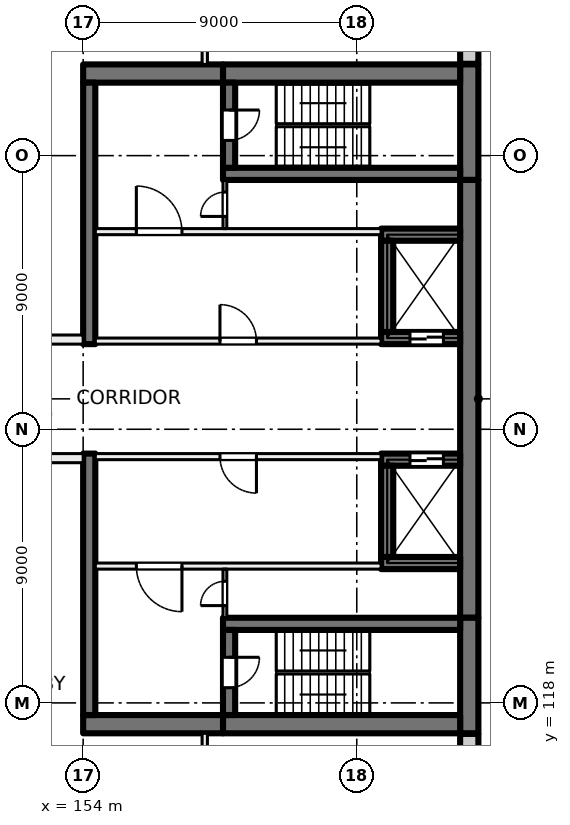
"""IFC4 building model, lengths in metres.
Left out: names, types, materials, properties, quantities, classifications, styles, units other than length and angle.
Written with IfcOpenShell. Run it as: python <this file> out.ifc"""

import sys

from ifc_helpers import new_model, si_unit, direction, frame, frame_2d, origin, place, context, subcontext, project, spatial, rectangle, extrude, element, fill, save


model = new_model("IFC4")
c1 = context("Model", 3, precision=1e-05, world=origin(), true_north=direction((0.0, 1.0)))
c2 = subcontext(c1, "Body", "Model", "MODEL_VIEW")
j1 = project(units=[si_unit("LENGTHUNIT", "METRE"), si_unit("PLANEANGLEUNIT", "RADIAN")], contexts=[c1])
p1 = place(None, origin())
s1 = spatial("IfcSite", under=j1, at=p1, CompositionType="ELEMENT")
p2 = place(p1, origin())
s2 = spatial("IfcBuilding", under=s1, at=p2, CompositionType="ELEMENT")
p3 = place(p2, frame((0.0, 0.0, 39.5)))
s3 = spatial("IfcBuildingStorey", under=s2, at=p3, CompositionType="ELEMENT", Elevation=39.5)
p4 = place(p3, frame((166.7, 139.0, 0.0), z_axis=(0.0, 0.0, 1.0), x_axis=(0.0, -1.0, 0.0)))
e1 = element("IfcWall", 1, at=p4, inside=s3, PredefinedType="SHEAR", context=c2, shape_type="SweptSolid", body=[
    extrude(rectangle(XDim=3.8, YDim=0.6, at=frame_2d((1.9, 0.0))), origin(), (0.0, 0.0, 1.0), 4.0),
])
p5 = place(p3, frame((166.7, 135.2, 0.0), z_axis=(0.0, 0.0, 1.0), x_axis=(0.0, -1.0, 0.0)))
e2 = element("IfcWall", 2, at=p5, inside=s3, PredefinedType="SHEAR", context=c2, shape_type="SweptSolid", body=[
    extrude(rectangle(XDim=14.4, YDim=0.6, at=frame_2d((7.2, 0.0))), origin(), (0.0, 0.0, 1.0), 4.0),
])
p6 = place(p3, frame((166.7, 120.8, 0.0), z_axis=(0.0, 0.0, 1.0), x_axis=(0.0, -1.0, 0.0)))
e3 = element("IfcWall", 3, at=p6, inside=s3, PredefinedType="SHEAR", context=c2, shape_type="SweptSolid", body=[
    extrude(rectangle(XDim=3.8, YDim=0.6, at=frame_2d((1.9, 0.0))), origin(), (0.0, 0.0, 1.0), 4.0),
])
for number, where, z_axis, x_axis in (
    (4, (166.4, 138.7, 0.0), (0.0, 0.0, 1.0), (-1.0, 0.0, 0.0)),
    (5, (166.4, 117.3, 0.0), (0.0, 0.0, 1.0), (-1.0, 0.0, 0.0)),
):
    element("IfcWall", number, at=place(p3, frame(where, z_axis=z_axis, x_axis=x_axis)), inside=s3, PredefinedType="SHEAR", context=c2, shape_type="SweptSolid", body=[
        extrude(rectangle(XDim=7.8, YDim=0.6, at=frame_2d((3.9, 0.0))), origin(), (0.0, 0.0, 1.0), 4.0),
    ])
for number, where, z_axis, x_axis in (
    (6, (158.6, 138.7, 0.0), (0.0, 0.0, 1.0), (-1.0, 0.0, 0.0)),
    (7, (158.6, 117.3, 0.0), (0.0, 0.0, 1.0), (-1.0, 0.0, 0.0)),
):
    element("IfcWall", number, at=place(p3, frame(where, z_axis=z_axis, x_axis=x_axis)), inside=s3, PredefinedType="SHEAR", context=c2, shape_type="SweptSolid", body=[
        extrude(rectangle(XDim=4.6, YDim=0.6, at=frame_2d((2.3, 0.0))), origin(), (0.0, 0.0, 1.0), 4.0),
    ])
p7 = place(p3, frame((166.4, 135.4, 0.0), z_axis=(0.0, 0.0, 1.0), x_axis=(-1.0, 0.0, 0.0)))
e8 = element("IfcWall", 8, at=p7, inside=s3, PredefinedType="SHEAR", context=c2, shape_type="SweptSolid", body=[
    extrude(rectangle(XDim=7.8, YDim=0.4, at=frame_2d((3.9, 0.0))), origin(), (0.0, 0.0, 1.0), 4.0),
])
p8 = place(p3, frame((158.8, 138.4, 0.0), z_axis=(0.0, 0.0, 1.0), x_axis=(0.0, -1.0, 0.0)))
e9 = element("IfcWall", 9, at=p8, inside=s3, PredefinedType="SHEAR", context=c2, shape_type="SweptSolid", body=[
    extrude(rectangle(XDim=2.8, YDim=0.4, at=frame_2d((1.4, 0.0))), origin(), (0.0, 0.0, 1.0), 4.0),
])
p9 = place(p8, frame((0.9, 0.0, 0.0)))
e10 = element("IfcOpeningElement", 10, at=p9, cuts=e9, PredefinedType="OPENING", context=c2, shape_type="SweptSolid", body=[
    extrude(rectangle(XDim=1.0, YDim=2.1, at=frame_2d((0.5, 1.05))), frame((0.0, 0.21, 0.0), z_axis=(0.0, -1.0, 0.0), x_axis=(1.0, 0.0, 0.0)), (0.0, 0.0, 1.0), 0.42),
])
p10 = place(p3, frame((166.4, 120.6, 0.0), z_axis=(0.0, 0.0, 1.0), x_axis=(-1.0, 0.0, 0.0)))
e11 = element("IfcWall", 11, at=p10, inside=s3, PredefinedType="SHEAR", context=c2, shape_type="SweptSolid", body=[
    extrude(rectangle(XDim=7.8, YDim=0.4, at=frame_2d((3.9, 0.0))), origin(), (0.0, 0.0, 1.0), 4.0),
])
p11 = place(p3, frame((158.8, 120.4, 0.0), z_axis=(0.0, 0.0, 1.0), x_axis=(0.0, -1.0, 0.0)))
e12 = element("IfcWall", 12, at=p11, inside=s3, PredefinedType="SHEAR", context=c2, shape_type="SweptSolid", body=[
    extrude(rectangle(XDim=2.8, YDim=0.4, at=frame_2d((1.4, 0.0))), origin(), (0.0, 0.0, 1.0), 4.0),
])
p12 = place(p11, frame((0.9, 0.0, 0.0)))
e13 = element("IfcOpeningElement", 13, at=p12, cuts=e12, PredefinedType="OPENING", context=c2, shape_type="SweptSolid", body=[
    extrude(rectangle(XDim=1.0, YDim=2.1, at=frame_2d((0.5, 1.05))), frame((0.0, 0.21, 0.0), z_axis=(0.0, -1.0, 0.0), x_axis=(1.0, 0.0, 0.0)), (0.0, 0.0, 1.0), 0.42),
])
p13 = place(p3, frame((166.4, 130.0, 0.0), z_axis=(0.0, 0.0, 1.0), x_axis=(-1.0, 0.0, 0.0)))
e14 = element("IfcWall", 14, at=p13, inside=s3, PredefinedType="SHEAR", context=c2, shape_type="SweptSolid", body=[
    extrude(rectangle(XDim=2.6, YDim=0.4, at=frame_2d((1.3, 0.0))), origin(), (0.0, 0.0, 1.0), 4.0),
])
p14 = place(p13, frame((0.55, 0.0, 0.0)))
e15 = element("IfcOpeningElement", 15, at=p14, cuts=e14, PredefinedType="OPENING", context=c2, shape_type="SweptSolid", body=[
    extrude(rectangle(XDim=1.1, YDim=2.1, at=frame_2d((0.55, 1.05))), frame((0.0, 0.21, 0.0), z_axis=(0.0, -1.0, 0.0), x_axis=(1.0, 0.0, 0.0)), (0.0, 0.0, 1.0), 0.42),
])
p15 = place(p3, frame((166.4, 133.4, 0.0), z_axis=(0.0, 0.0, 1.0), x_axis=(-1.0, 0.0, 0.0)))
e16 = element("IfcWall", 16, at=p15, inside=s3, PredefinedType="SHEAR", context=c2, shape_type="SweptSolid", body=[
    extrude(rectangle(XDim=2.6, YDim=0.4, at=frame_2d((1.3, 0.0))), origin(), (0.0, 0.0, 1.0), 4.0),
])
p16 = place(p3, frame((164.0, 133.2, 0.0), z_axis=(0.0, 0.0, 1.0), x_axis=(0.0, -1.0, 0.0)))
e17 = element("IfcWall", 17, at=p16, inside=s3, PredefinedType="SHEAR", context=c2, shape_type="SweptSolid", body=[
    extrude(rectangle(XDim=3.0, YDim=0.4, at=frame_2d((1.5, 0.0))), origin(), (0.0, 0.0, 1.0), 4.0),
])
p17 = place(p3, frame((166.4, 126.0, 0.0), z_axis=(0.0, 0.0, 1.0), x_axis=(-1.0, 0.0, 0.0)))
e18 = element("IfcWall", 18, at=p17, inside=s3, PredefinedType="SHEAR", context=c2, shape_type="SweptSolid", body=[
    extrude(rectangle(XDim=2.6, YDim=0.4, at=frame_2d((1.3, 0.0))), origin(), (0.0, 0.0, 1.0), 4.0),
])
p18 = place(p17, frame((0.55, 0.0, 0.0)))
e19 = element("IfcOpeningElement", 19, at=p18, cuts=e18, PredefinedType="OPENING", context=c2, shape_type="SweptSolid", body=[
    extrude(rectangle(XDim=1.1, YDim=2.1, at=frame_2d((0.55, 1.05))), frame((0.0, 0.21, 0.0), z_axis=(0.0, -1.0, 0.0), x_axis=(1.0, 0.0, 0.0)), (0.0, 0.0, 1.0), 0.42),
])
p19 = place(p3, frame((166.4, 122.6, 0.0), z_axis=(0.0, 0.0, 1.0), x_axis=(-1.0, 0.0, 0.0)))
e20 = element("IfcWall", 20, at=p19, inside=s3, PredefinedType="SHEAR", context=c2, shape_type="SweptSolid", body=[
    extrude(rectangle(XDim=2.6, YDim=0.4, at=frame_2d((1.3, 0.0))), origin(), (0.0, 0.0, 1.0), 4.0),
])
p20 = place(p3, frame((164.0, 125.8, 0.0), z_axis=(0.0, 0.0, 1.0), x_axis=(0.0, -1.0, 0.0)))
e21 = element("IfcWall", 21, at=p20, inside=s3, PredefinedType="SHEAR", context=c2, shape_type="SweptSolid", body=[
    extrude(rectangle(XDim=3.0, YDim=0.4, at=frame_2d((1.5, 0.0))), origin(), (0.0, 0.0, 1.0), 4.0),
])
for number, where, z_axis, x_axis in (
    (22, (154.2, 138.4, 0.0), (0.0, 0.0, 1.0), (0.0, -1.0, 0.0)),
    (23, (154.2, 126.2, 0.0), (0.0, 0.0, 1.0), (0.0, -1.0, 0.0)),
):
    element("IfcWall", number, at=place(p3, frame(where, z_axis=z_axis, x_axis=x_axis)), inside=s3, PredefinedType="SHEAR", context=c2, shape_type="SweptSolid", body=[
        extrude(rectangle(XDim=8.6, YDim=0.4, at=frame_2d((4.3, 0.0))), origin(), (0.0, 0.0, 1.0), 4.0),
    ])
p21 = place(p3, frame((166.7, 116.98, 0.0), z_axis=(0.0, 0.0, 1.0), x_axis=(0.0, -1.0, 0.0)))
e24 = element("IfcWall", 24, at=p21, inside=s3, PredefinedType="SOLIDWALL", context=c2, shape_type="SweptSolid", body=[
    extrude(rectangle(XDim=2.98, YDim=0.6, at=frame_2d((1.49, 0.0))), origin(), (0.0, 0.0, 1.0), 3.625),
])
p22 = place(p3, frame((166.7, 141.93, 0.0), z_axis=(0.0, 0.0, 1.0), x_axis=(0.0, -1.0, 0.0)))
e25 = element("IfcWall", 25, at=p22, inside=s3, PredefinedType="SOLIDWALL", context=c2, shape_type="SweptSolid", body=[
    extrude(rectangle(XDim=2.91, YDim=0.6, at=frame_2d((1.455, 0.0))), origin(), (0.0, 0.0, 1.0), 3.625),
])
p23 = place(p3, frame((163.8, 126.1, 0.0), z_axis=(0.0, 0.0, 1.0), x_axis=(-1.0, 0.0, 0.0)))
e26 = element("IfcWall", 26, at=p23, inside=s3, PredefinedType="PARTITIONING", context=c2, shape_type="SweptSolid", body=[
    extrude(rectangle(XDim=9.4, YDim=0.2, at=frame_2d((4.7, 0.0))), origin(), (0.0, 0.0, 1.0), 3.625),
])
p24 = place(p23, frame((4.1, 0.0, 0.0)))
e27 = element("IfcOpeningElement", 27, at=p24, cuts=e26, PredefinedType="OPENING", context=c2, shape_type="SweptSolid", body=[
    extrude(rectangle(XDim=1.2, YDim=2.1, at=frame_2d((0.6, 1.05))), frame((0.0, 0.11, 0.0), z_axis=(0.0, -1.0, 0.0), x_axis=(1.0, 0.0, 0.0)), (0.0, 0.0, 1.0), 0.22),
])
p25 = place(p3, frame((163.8, 122.5, 0.0), z_axis=(0.0, 0.0, 1.0), x_axis=(-1.0, 0.0, 0.0)))
e28 = element("IfcWall", 28, at=p25, inside=s3, PredefinedType="PARTITIONING", context=c2, shape_type="SweptSolid", body=[
    extrude(rectangle(XDim=9.4, YDim=0.2, at=frame_2d((4.7, 0.0))), origin(), (0.0, 0.0, 1.0), 3.625),
])
p26 = place(p25, frame((6.55, 0.0, 0.0)))
e29 = element("IfcOpeningElement", 29, at=p26, cuts=e28, PredefinedType="OPENING", context=c2, shape_type="SweptSolid", body=[
    extrude(rectangle(XDim=1.5, YDim=2.1, at=frame_2d((0.75, 1.05))), frame((0.0, 0.11, 0.0), z_axis=(0.0, -1.0, 0.0), x_axis=(1.0, 0.0, 0.0)), (0.0, 0.0, 1.0), 0.22),
])
p27 = place(p3, frame((158.663, 120.8, 0.0), z_axis=(0.0, 0.0, 1.0), x_axis=(0.0, 1.0, 0.0)))
e30 = element("IfcWall", 30, at=p27, inside=s3, PredefinedType="PARTITIONING", context=c2, shape_type="SweptSolid", body=[
    extrude(rectangle(XDim=1.6, YDim=0.125, at=frame_2d((0.8, 0.0))), origin(), (0.0, 0.0, 1.0), 3.625),
])
p28 = place(p27, frame((0.4, 0.0, 0.0)))
e31 = element("IfcOpeningElement", 31, at=p28, cuts=e30, PredefinedType="OPENING", context=c2, shape_type="SweptSolid", body=[
    extrude(rectangle(XDim=0.8, YDim=2.1, at=frame_2d((0.4, 1.05))), frame((0.0, 0.073, 0.0), z_axis=(0.0, -1.0, 0.0), x_axis=(1.0, 0.0, 0.0)), (0.0, 0.0, 1.0), 0.145),
])
p29 = place(p3, frame((154.4, 129.9, 0.0), z_axis=(0.0, 0.0, 1.0), x_axis=(1.0, 0.0, 0.0)))
e32 = element("IfcWall", 32, at=p29, inside=s3, PredefinedType="PARTITIONING", context=c2, shape_type="SweptSolid", body=[
    extrude(rectangle(XDim=9.4, YDim=0.2, at=frame_2d((4.7, 0.0))), origin(), (0.0, 0.0, 1.0), 3.625),
])
p30 = place(p29, frame((4.1, 0.0, 0.0)))
e33 = element("IfcOpeningElement", 33, at=p30, cuts=e32, PredefinedType="OPENING", context=c2, shape_type="SweptSolid", body=[
    extrude(rectangle(XDim=1.2, YDim=2.1, at=frame_2d((0.6, 1.05))), frame((0.0, 0.11, 0.0), z_axis=(0.0, -1.0, 0.0), x_axis=(1.0, 0.0, 0.0)), (0.0, 0.0, 1.0), 0.22),
])
p31 = place(p3, frame((154.4, 133.5, 0.0), z_axis=(0.0, 0.0, 1.0), x_axis=(1.0, 0.0, 0.0)))
e34 = element("IfcWall", 34, at=p31, inside=s3, PredefinedType="PARTITIONING", context=c2, shape_type="SweptSolid", body=[
    extrude(rectangle(XDim=9.4, YDim=0.2, at=frame_2d((4.7, 0.0))), origin(), (0.0, 0.0, 1.0), 3.625),
])
p32 = place(p31, frame((1.35, 0.0, 0.0)))
e35 = element("IfcOpeningElement", 35, at=p32, cuts=e34, PredefinedType="OPENING", context=c2, shape_type="SweptSolid", body=[
    extrude(rectangle(XDim=1.5, YDim=2.1, at=frame_2d((0.75, 1.05))), frame((0.0, 0.11, 0.0), z_axis=(0.0, -1.0, 0.0), x_axis=(1.0, 0.0, 0.0)), (0.0, 0.0, 1.0), 0.22),
])
p33 = place(p3, frame((158.663, 133.6, 0.0), z_axis=(0.0, 0.0, 1.0), x_axis=(0.0, 1.0, 0.0)))
e36 = element("IfcWall", 36, at=p33, inside=s3, PredefinedType="PARTITIONING", context=c2, shape_type="SweptSolid", body=[
    extrude(rectangle(XDim=1.6, YDim=0.125, at=frame_2d((0.8, 0.0))), origin(), (0.0, 0.0, 1.0), 3.625),
])
p34 = place(p33, frame((0.4, 0.0, 0.0)))
e37 = element("IfcOpeningElement", 37, at=p34, cuts=e36, PredefinedType="OPENING", context=c2, shape_type="SweptSolid", body=[
    extrude(rectangle(XDim=0.8, YDim=2.1, at=frame_2d((0.4, 1.05))), frame((0.0, 0.073, 0.0), z_axis=(0.0, -1.0, 0.0), x_axis=(1.0, 0.0, 0.0)), (0.0, 0.0, 1.0), 0.145),
])
p35 = place(p3, frame((140.0, 129.95, 0.0), z_axis=(0.0, 0.0, 1.0), x_axis=(1.0, 0.0, 0.0)))
e38 = element("IfcWall", 38, at=p35, inside=s3, PredefinedType="PARTITIONING", context=c2, shape_type="SweptSolid", body=[
    extrude(rectangle(XDim=14.0, YDim=0.3, at=frame_2d((7.0, 0.0))), origin(), (0.0, 0.0, 1.0), 3.625),
])
p36 = place(p35, frame((6.1, 0.0, 0.0)))
e39 = element("IfcOpeningElement", 39, at=p36, cuts=e38, PredefinedType="OPENING", context=c2, shape_type="SweptSolid", body=[
    extrude(rectangle(XDim=1.8, YDim=2.1, at=frame_2d((0.9, 1.05))), frame((0.0, 0.16, 0.0), z_axis=(0.0, -1.0, 0.0), x_axis=(1.0, 0.0, 0.0)), (0.0, 0.0, 1.0), 0.32),
])
p37 = place(p3, frame((154.0, 126.05, 0.0), z_axis=(0.0, 0.0, 1.0), x_axis=(-1.0, 0.0, 0.0)))
e40 = element("IfcWall", 40, at=p37, inside=s3, PredefinedType="PARTITIONING", context=c2, shape_type="SweptSolid", body=[
    extrude(rectangle(XDim=14.0, YDim=0.3, at=frame_2d((7.0, 0.0))), origin(), (0.0, 0.0, 1.0), 3.625),
])
p38 = place(p37, frame((7.75, 0.0, 0.0)))
e41 = element("IfcOpeningElement", 41, at=p38, cuts=e40, PredefinedType="OPENING", context=c2, shape_type="SweptSolid", body=[
    extrude(rectangle(XDim=1.0, YDim=2.1, at=frame_2d((0.5, 1.05))), frame((0.0, 0.16, 0.0), z_axis=(0.0, -1.0, 0.0), x_axis=(1.0, 0.0, 0.0)), (0.0, 0.0, 1.0), 0.32),
])
p39 = place(p37, frame((1.6, 0.0, 0.0)))
e42 = element("IfcOpeningElement", 42, at=p39, cuts=e40, PredefinedType="OPENING", context=c2, shape_type="SweptSolid", body=[
    extrude(rectangle(XDim=1.8, YDim=2.1, at=frame_2d((0.9, 1.05))), frame((0.0, 0.16, 0.0), z_axis=(0.0, -1.0, 0.0), x_axis=(1.0, 0.0, 0.0)), (0.0, 0.0, 1.0), 0.32),
])
p40 = place(p3, frame((158.0, 110.6, 0.0), z_axis=(0.0, 0.0, 1.0), x_axis=(0.0, 1.0, 0.0)))
e43 = element("IfcWall", 43, at=p40, inside=s3, PredefinedType="PARTITIONING", context=c2, shape_type="SweptSolid", body=[
    extrude(rectangle(XDim=6.4, YDim=0.175, at=frame_2d((3.2, 0.0))), origin(), (0.0, 0.0, 1.0), 3.625),
])
p41 = place(p40, frame((2.6, 0.0, 0.0)))
e44 = element("IfcOpeningElement", 44, at=p41, cuts=e43, PredefinedType="OPENING", context=c2, shape_type="SweptSolid", body=[
    extrude(rectangle(XDim=1.2, YDim=2.1, at=frame_2d((0.6, 1.05))), frame((0.0, 0.097, 0.0), z_axis=(0.0, -1.0, 0.0), x_axis=(1.0, 0.0, 0.0)), (0.0, 0.0, 1.0), 0.195),
])
p42 = place(p3, frame((158.0, 139.0, 0.0), z_axis=(0.0, 0.0, 1.0), x_axis=(0.0, 1.0, 0.0)))
e45 = element("IfcWall", 45, at=p42, inside=s3, PredefinedType="PARTITIONING", context=c2, shape_type="SweptSolid", body=[
    extrude(rectangle(XDim=6.4, YDim=0.175, at=frame_2d((3.2, 0.0))), origin(), (0.0, 0.0, 1.0), 3.625),
])
p43 = place(p42, frame((2.6, 0.0, 0.0)))
e46 = element("IfcOpeningElement", 46, at=p43, cuts=e45, PredefinedType="OPENING", context=c2, shape_type="SweptSolid", body=[
    extrude(rectangle(XDim=1.2, YDim=2.1, at=frame_2d((0.6, 1.05))), frame((0.0, 0.097, 0.0), z_axis=(0.0, -1.0, 0.0), x_axis=(1.0, 0.0, 0.0)), (0.0, 0.0, 1.0), 0.195),
])
p44 = place(p18, origin())
e47 = element("IfcDoor", 47, at=p44, inside=s3, OperationType="DOUBLE_DOOR_SLIDING", PredefinedType="DOOR", context=c2, shape_type="SweptSolid", body=[
    extrude(rectangle(XDim=1.1, YDim=2.1, at=frame_2d((0.55, 1.05))), frame((0.0, 0.025, 0.0), z_axis=(0.0, -1.0, 0.0), x_axis=(1.0, 0.0, 0.0)), (0.0, 0.0, 1.0), 0.05),
])
fill(e19, e47)
p45 = place(p14, origin())
e48 = element("IfcDoor", 48, at=p45, inside=s3, OperationType="DOUBLE_DOOR_SLIDING", PredefinedType="DOOR", context=c2, shape_type="SweptSolid", body=[
    extrude(rectangle(XDim=1.1, YDim=2.1, at=frame_2d((0.55, 1.05))), frame((0.0, 0.025, 0.0), z_axis=(0.0, -1.0, 0.0), x_axis=(1.0, 0.0, 0.0)), (0.0, 0.0, 1.0), 0.05),
])
fill(e15, e48)
p46 = place(p24, origin())
e49 = element("IfcDoor", 49, at=p46, inside=s3, OperationType="DOUBLE_DOOR_SINGLE_SWING", PredefinedType="DOOR", context=c2, shape_type="SweptSolid", body=[
    extrude(rectangle(XDim=1.2, YDim=2.1, at=frame_2d((0.6, 1.05))), frame((0.0, 0.025, 0.0), z_axis=(0.0, -1.0, 0.0), x_axis=(1.0, 0.0, 0.0)), (0.0, 0.0, 1.0), 0.05),
])
fill(e27, e49)
p47 = place(p26, origin())
e50 = element("IfcDoor", 50, at=p47, inside=s3, OperationType="DOUBLE_DOOR_SINGLE_SWING", PredefinedType="DOOR", context=c2, shape_type="SweptSolid", body=[
    extrude(rectangle(XDim=1.5, YDim=2.1, at=frame_2d((0.75, 1.05))), frame((0.0, 0.025, 0.0), z_axis=(0.0, -1.0, 0.0), x_axis=(1.0, 0.0, 0.0)), (0.0, 0.0, 1.0), 0.05),
])
fill(e29, e50)
p48 = place(p12, origin())
e51 = element("IfcDoor", 51, at=p48, inside=s3, OperationType="SINGLE_SWING_LEFT", PredefinedType="DOOR", context=c2, shape_type="SweptSolid", body=[
    extrude(rectangle(XDim=1.0, YDim=2.1, at=frame_2d((0.5, 1.05))), frame((0.0, 0.025, 0.0), z_axis=(0.0, -1.0, 0.0), x_axis=(1.0, 0.0, 0.0)), (0.0, 0.0, 1.0), 0.05),
])
fill(e13, e51)
p49 = place(p28, origin())
e52 = element("IfcDoor", 52, at=p49, inside=s3, OperationType="SINGLE_SWING_RIGHT", PredefinedType="DOOR", context=c2, shape_type="SweptSolid", body=[
    extrude(rectangle(XDim=0.8, YDim=2.1, at=frame_2d((0.4, 1.05))), frame((0.0, 0.025, 0.0), z_axis=(0.0, -1.0, 0.0), x_axis=(1.0, 0.0, 0.0)), (0.0, 0.0, 1.0), 0.05),
])
fill(e31, e52)
p50 = place(p30, origin())
e53 = element("IfcDoor", 53, at=p50, inside=s3, OperationType="DOUBLE_DOOR_SINGLE_SWING", PredefinedType="DOOR", context=c2, shape_type="SweptSolid", body=[
    extrude(rectangle(XDim=1.2, YDim=2.1, at=frame_2d((0.6, 1.05))), frame((0.0, 0.025, 0.0), z_axis=(0.0, -1.0, 0.0), x_axis=(1.0, 0.0, 0.0)), (0.0, 0.0, 1.0), 0.05),
])
fill(e33, e53)
p51 = place(p32, origin())
e54 = element("IfcDoor", 54, at=p51, inside=s3, OperationType="DOUBLE_DOOR_SINGLE_SWING", PredefinedType="DOOR", context=c2, shape_type="SweptSolid", body=[
    extrude(rectangle(XDim=1.5, YDim=2.1, at=frame_2d((0.75, 1.05))), frame((0.0, 0.025, 0.0), z_axis=(0.0, -1.0, 0.0), x_axis=(1.0, 0.0, 0.0)), (0.0, 0.0, 1.0), 0.05),
])
fill(e35, e54)
p52 = place(p9, origin())
e55 = element("IfcDoor", 55, at=p52, inside=s3, OperationType="SINGLE_SWING_RIGHT", PredefinedType="DOOR", context=c2, shape_type="SweptSolid", body=[
    extrude(rectangle(XDim=1.0, YDim=2.1, at=frame_2d((0.5, 1.05))), frame((0.0, 0.025, 0.0), z_axis=(0.0, -1.0, 0.0), x_axis=(1.0, 0.0, 0.0)), (0.0, 0.0, 1.0), 0.05),
])
fill(e10, e55)
p53 = place(p34, origin())
e56 = element("IfcDoor", 56, at=p53, inside=s3, OperationType="SINGLE_SWING_LEFT", PredefinedType="DOOR", context=c2, shape_type="SweptSolid", body=[
    extrude(rectangle(XDim=0.8, YDim=2.1, at=frame_2d((0.4, 1.05))), frame((0.0, 0.025, 0.0), z_axis=(0.0, -1.0, 0.0), x_axis=(1.0, 0.0, 0.0)), (0.0, 0.0, 1.0), 0.05),
])
fill(e37, e56)
save(model, sys.argv[1])
